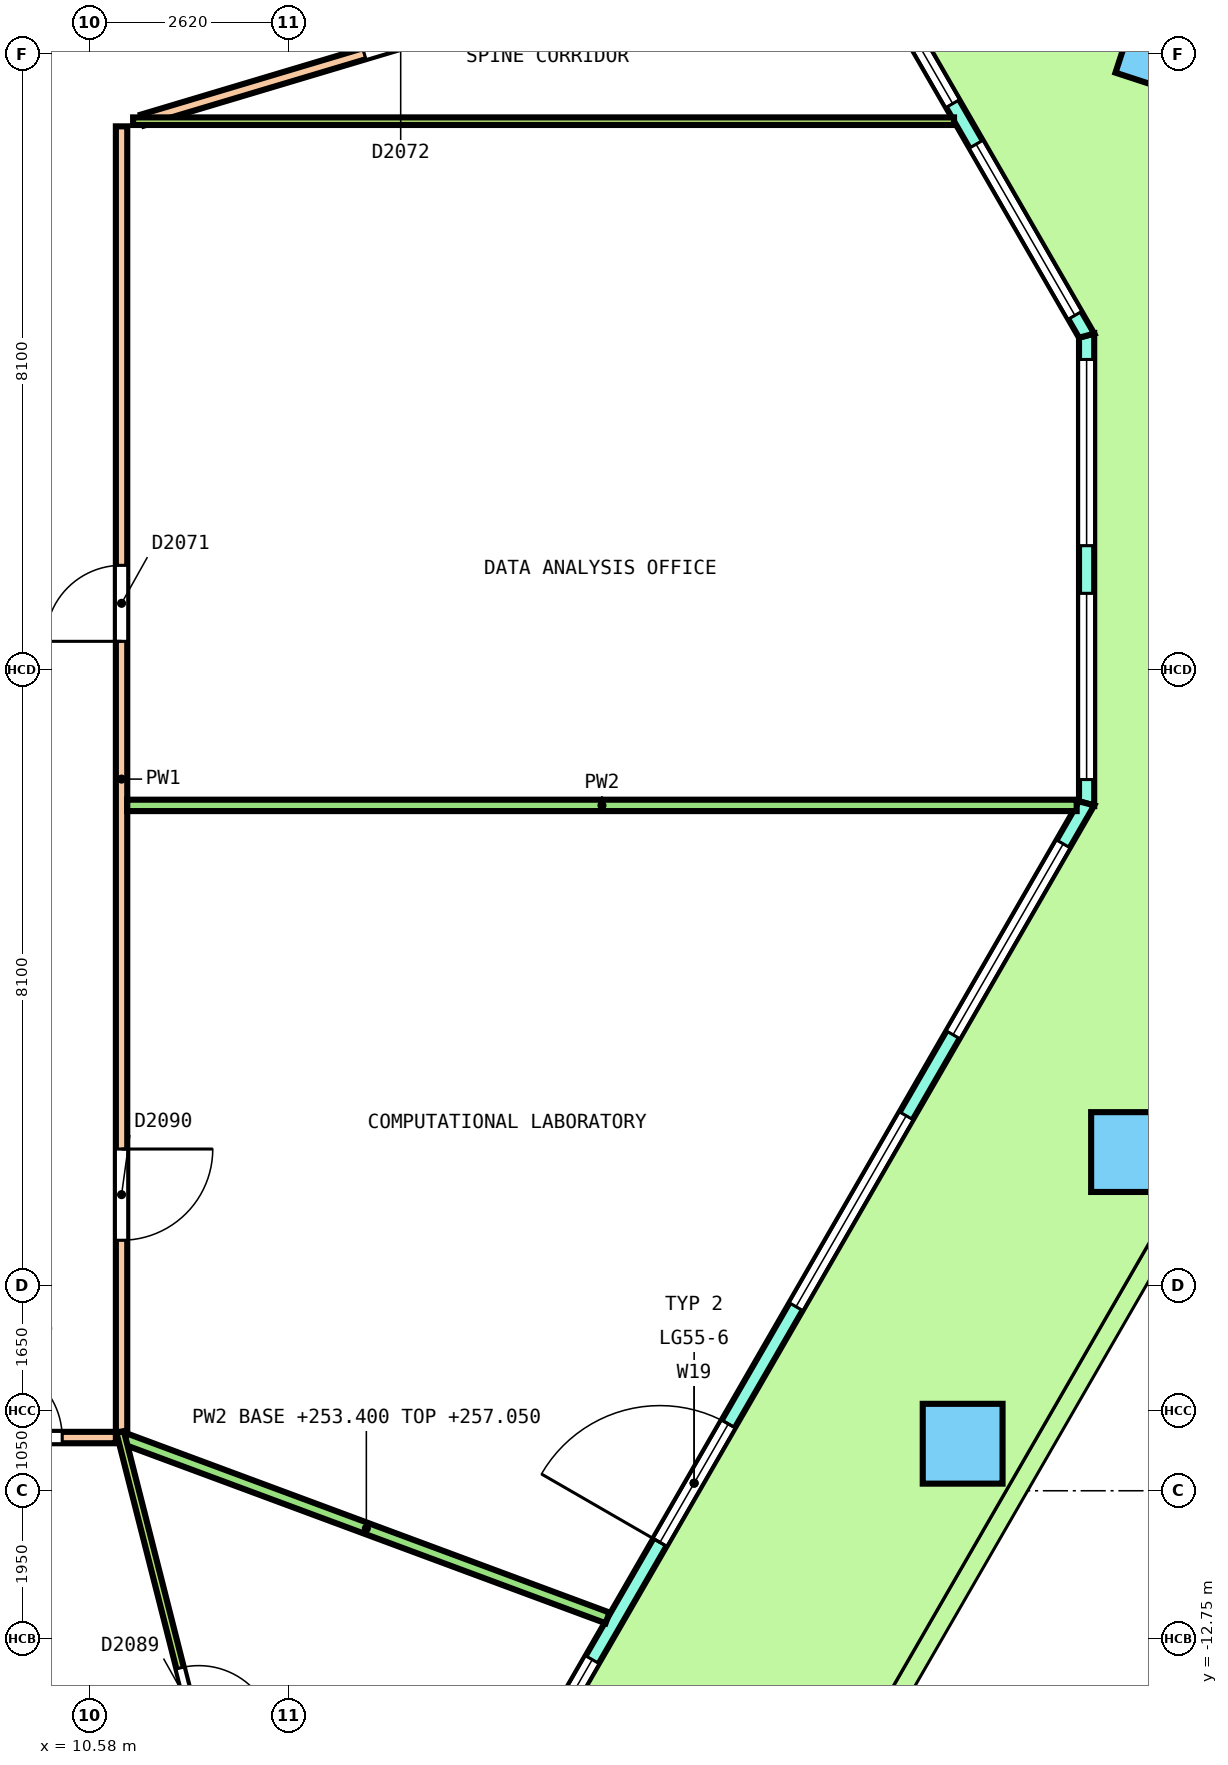
"""IFC4 building model, lengths in metres.
Left out: names, types, materials, properties, quantities, classifications, styles, units other than length and angle.
Written with IfcOpenShell. Run it as: python <this file> out.ifc"""

import sys

from ifc_helpers import new_model, si_unit, direction, frame, frame_2d, origin, origin_2d, place, context, subcontext, project, spatial, polyline, rectangle, outline, extrude, element, fill, save


model = new_model("IFC4")
c1 = context("Model", 3, precision=1e-05, world=origin(), true_north=direction((0.0, 1.0)))
c2 = subcontext(c1, "Body", "Model", "MODEL_VIEW")
j1 = project(units=[si_unit("LENGTHUNIT", "METRE"), si_unit("PLANEANGLEUNIT", "RADIAN")], contexts=[c1])
p1 = place(None, origin())
s1 = spatial("IfcSite", under=j1, at=p1, CompositionType="ELEMENT")
p2 = place(p1, origin())
s2 = spatial("IfcBuilding", under=s1, at=p2, CompositionType="ELEMENT")
p3 = place(p2, frame((0.0, 0.0, 253.4)))
s3 = spatial("IfcBuildingStorey", under=s2, at=p3, CompositionType="ELEMENT", Elevation=253.4)
p4 = place(p3, frame((24.738, 8.192, 0.0), z_axis=(-0.21585398852, -0.249223026933, 0.944084179767), x_axis=(-0.526275882719, 0.844112769498, 0.102505256644)))
e1 = element("IfcColumn", 1, at=p4, inside=s3, PredefinedType="COLUMN", context=c2, shape_type="SweptSolid", body=[
    extrude(rectangle(XDim=1.05, YDim=1.05, at=origin_2d()), origin(), (0.0, 0.0, 1.0), 3.856),
])
for number, where, z_axis, x_axis in (
    (2, (19.85, -14.019, 0.0), (0.038, 0.066, 0.997), (0.499, 0.863, -0.076)),
    (3, (22.065, -10.181, 0.0), (-0.038, -0.066, 0.997), (0.499, 0.863, 0.076)),
):
    element("IfcColumn", number, at=place(p3, frame(where, z_axis=z_axis, x_axis=x_axis)), inside=s3, PredefinedType="COLUMN", context=c2, shape_type="SweptSolid", body=[
        extrude(rectangle(XDim=1.05, YDim=1.05, at=origin_2d()), origin(), (0.0, 0.0, 1.0), 3.651),
    ])
p5 = place(p3, frame((24.281, -6.344, 0.0), z_axis=(-0.11141157775, -0.193008789623, 0.974851305313), x_axis=(0.487356172792, 0.844286105721, 0.222856304663)))
e4 = element("IfcColumn", 4, at=p5, inside=s3, PredefinedType="COLUMN", context=c2, shape_type="SweptSolid", body=[
    extrude(rectangle(XDim=1.05, YDim=1.05, at=origin_2d()), origin(), (0.0, 0.0, 1.0), 3.734),
])
p6 = place(p3, frame((23.696, -1.757, 0.0), z_axis=(0.0, 0.0, 1.0), x_axis=(0.0, 1.0, 0.0)))
e5 = element("IfcWall", 5, at=p6, inside=s3, PredefinedType="SOLIDWALL", context=c2, shape_type="SweptSolid", body=[
    extrude(outline(polyline([(-0.027, -0.1), (1.008, -0.1), (2.042, -0.1), (3.077, -0.1), (4.111, -0.1), (5.146, -0.1), (6.18, -0.1), (6.126, 0.1), (5.11, 0.1), (4.093, 0.1), (3.077, 0.1), (2.06, 0.1), (1.043, 0.1), (0.027, 0.1), (-0.027, -0.1)])), origin(), (0.0, 0.0, 1.0), 3.7),
])
p7 = place(p6, frame((0.313, 0.0, 0.1)))
e6 = element("IfcOpeningElement", 6, at=p7, cuts=e5, PredefinedType="OPENING", context=c2, shape_type="SweptSolid", body=[
    extrude(rectangle(XDim=2.45, YDim=2.65, at=frame_2d((1.225, 1.325))), frame((0.0, 0.11, 0.0), z_axis=(0.0, -1.0, 0.0), x_axis=(1.0, 0.0, 0.0)), (0.0, 0.0, 1.0), 0.22),
])
p8 = place(p6, frame((3.39, 0.0, 0.1)))
e7 = element("IfcOpeningElement", 7, at=p8, cuts=e5, PredefinedType="OPENING", context=c2, shape_type="SweptSolid", body=[
    extrude(rectangle(XDim=2.45, YDim=2.65, at=frame_2d((1.225, 1.325))), frame((0.0, 0.11, 0.0), z_axis=(0.0, -1.0, 0.0), x_axis=(1.0, 0.0, 0.0)), (0.0, 0.0, 1.0), 0.22),
])
p9 = place(p3, frame((23.696, 4.396, 0.0), z_axis=(0.0, 0.0, 1.0), x_axis=(-0.500000613642, 0.866025049498, 0.0)))
e8 = element("IfcWall", 8, at=p9, inside=s3, PredefinedType="SOLIDWALL", context=c2, shape_type="SweptSolid", body=[
    extrude(outline(polyline([(-0.027, -0.1), (0.982, -0.1), (1.99, -0.1), (2.999, -0.1), (4.007, -0.1), (5.015, -0.1), (6.024, -0.1), (7.032, -0.1), (8.041, -0.1), (9.049, -0.1), (10.058, -0.1), (11.066, -0.1), (12.075, -0.1), (13.083, -0.1), (14.092, -0.1), (15.1, -0.1), (16.108, -0.1), (16.055, 0.1), (15.053, 0.1), (14.051, 0.1), (13.05, 0.1), (12.048, 0.1), (11.046, 0.1), (10.044, 0.1), (9.042, 0.1), (8.041, 0.1), (7.039, 0.1), (6.037, 0.1), (5.036, 0.1), (4.034, 0.1), (3.032, 0.1), (2.03, 0.1), (1.029, 0.1), (0.027, 0.1), (-0.027, -0.1)])), origin(), (0.0, 0.0, 1.0), 3.7),
])
p10 = place(p9, frame((0.308, 0.0, 0.1)))
e9 = element("IfcOpeningElement", 9, at=p10, cuts=e8, PredefinedType="OPENING", context=c2, shape_type="SweptSolid", body=[
    extrude(rectangle(XDim=2.6, YDim=2.65, at=frame_2d((1.3, 1.325))), frame((0.0, 0.11, 0.0), z_axis=(0.0, -1.0, 0.0), x_axis=(1.0, 0.0, 0.0)), (0.0, 0.0, 1.0), 0.22),
])
p11 = place(p9, frame((3.524, 0.0, 0.1)))
e10 = element("IfcOpeningElement", 10, at=p11, cuts=e8, PredefinedType="OPENING", context=c2, shape_type="SweptSolid", body=[
    extrude(rectangle(XDim=2.6, YDim=2.65, at=frame_2d((1.3, 1.325))), frame((0.0, 0.11, 0.0), z_axis=(0.0, -1.0, 0.0), x_axis=(1.0, 0.0, 0.0)), (0.0, 0.0, 1.0), 0.22),
])
p12 = place(p9, frame((7.141, 0.0, 0.0)))
e11 = element("IfcOpeningElement", 11, at=p12, cuts=e8, PredefinedType="OPENING", context=c2, shape_type="SweptSolid", body=[
    extrude(rectangle(XDim=1.8, YDim=2.4, at=frame_2d((0.9, 1.2))), frame((0.0, 0.11, 0.0), z_axis=(0.0, -1.0, 0.0), x_axis=(1.0, 0.0, 0.0)), (0.0, 0.0, 1.0), 0.22),
])
p13 = place(p9, frame((7.141, 0.0, 2.55)))
e12 = element("IfcOpeningElement", 12, at=p13, cuts=e8, PredefinedType="OPENING", context=c2, shape_type="SweptSolid", body=[
    extrude(rectangle(XDim=1.8, YDim=0.2, at=frame_2d((0.9, 0.1))), frame((0.0, 0.11, 0.0), z_axis=(0.0, -1.0, 0.0), x_axis=(1.0, 0.0, 0.0)), (0.0, 0.0, 1.0), 0.22),
])
p14 = place(p9, frame((9.957, 0.0, 0.1)))
e13 = element("IfcOpeningElement", 13, at=p14, cuts=e8, PredefinedType="OPENING", context=c2, shape_type="SweptSolid", body=[
    extrude(rectangle(XDim=2.6, YDim=2.65, at=frame_2d((1.3, 1.325))), frame((0.0, 0.11, 0.0), z_axis=(0.0, -1.0, 0.0), x_axis=(1.0, 0.0, 0.0)), (0.0, 0.0, 1.0), 0.22),
])
p15 = place(p9, frame((13.174, 0.0, 0.1)))
e14 = element("IfcOpeningElement", 14, at=p15, cuts=e8, PredefinedType="OPENING", context=c2, shape_type="SweptSolid", body=[
    extrude(rectangle(XDim=2.6, YDim=2.65, at=frame_2d((1.3, 1.325))), frame((0.0, 0.11, 0.0), z_axis=(0.0, -1.0, 0.0), x_axis=(1.0, 0.0, 0.0)), (0.0, 0.0, 1.0), 0.22),
])
p16 = place(p3, frame((13.369, -19.643, 0.0), z_axis=(0.0, 0.0, 1.0), x_axis=(0.500000087574, 0.866025353224, 0.0)))
e15 = element("IfcWall", 15, at=p16, inside=s3, PredefinedType="SOLIDWALL", context=c2, shape_type="SweptSolid", body=[
    extrude(outline(polyline([(-0.027, -0.1), (1.009, -0.1), (2.044, -0.1), (3.079, -0.1), (4.115, -0.1), (5.15, -0.1), (6.185, -0.1), (7.221, -0.1), (8.256, -0.1), (9.292, -0.1), (10.327, -0.1), (11.362, -0.1), (12.398, -0.1), (13.433, -0.1), (14.469, -0.1), (15.504, -0.1), (16.539, -0.1), (17.574, -0.1), (18.61, -0.1), (19.645, -0.1), (20.681, -0.1), (20.627, 0.1), (19.597, 0.1), (18.567, 0.1), (17.537, 0.1), (16.507, 0.1), (15.477, 0.1), (14.447, 0.1), (13.417, 0.1), (12.387, 0.1), (11.357, 0.1), (10.327, 0.1), (9.297, 0.1), (8.267, 0.1), (7.237, 0.1), (6.207, 0.1), (5.177, 0.1), (4.147, 0.1), (3.117, 0.1), (2.087, 0.1), (1.057, 0.1), (0.027, 0.1), (-0.027, -0.1)])), origin(), (0.0, 0.0, 1.0), 3.7),
])
p17 = place(p16, frame((0.615, 0.0, 0.1)))
e16 = element("IfcOpeningElement", 16, at=p17, cuts=e15, PredefinedType="OPENING", context=c2, shape_type="SweptSolid", body=[
    extrude(rectangle(XDim=2.9, YDim=2.65, at=frame_2d((1.45, 1.325))), frame((0.0, 0.11, 0.0), z_axis=(0.0, -1.0, 0.0), x_axis=(1.0, 0.0, 0.0)), (0.0, 0.0, 1.0), 0.22),
])
p18 = place(p16, frame((4.746, 0.0, 0.1)))
e17 = element("IfcOpeningElement", 17, at=p18, cuts=e15, PredefinedType="OPENING", context=c2, shape_type="SweptSolid", body=[
    extrude(rectangle(XDim=2.9, YDim=2.65, at=frame_2d((1.45, 1.325))), frame((0.0, 0.11, 0.0), z_axis=(0.0, -1.0, 0.0), x_axis=(1.0, 0.0, 0.0)), (0.0, 0.0, 1.0), 0.22),
])
p19 = place(p16, frame((9.427, 0.0, 0.0)))
e18 = element("IfcOpeningElement", 18, at=p19, cuts=e15, PredefinedType="OPENING", context=c2, shape_type="SweptSolid", body=[
    extrude(rectangle(XDim=1.8, YDim=2.4, at=frame_2d((0.9, 1.2))), frame((0.0, 0.11, 0.0), z_axis=(0.0, -1.0, 0.0), x_axis=(1.0, 0.0, 0.0)), (0.0, 0.0, 1.0), 0.22),
])
p20 = place(p16, frame((9.427, 0.0, 2.55)))
e19 = element("IfcOpeningElement", 19, at=p20, cuts=e15, PredefinedType="OPENING", context=c2, shape_type="SweptSolid", body=[
    extrude(rectangle(XDim=1.8, YDim=0.2, at=frame_2d((0.9, 0.1))), frame((0.0, 0.11, 0.0), z_axis=(0.0, -1.0, 0.0), x_axis=(1.0, 0.0, 0.0)), (0.0, 0.0, 1.0), 0.22),
])
p21 = place(p16, frame((13.008, 0.0, 0.1)))
e20 = element("IfcOpeningElement", 20, at=p21, cuts=e15, PredefinedType="OPENING", context=c2, shape_type="SweptSolid", body=[
    extrude(rectangle(XDim=2.9, YDim=2.65, at=frame_2d((1.45, 1.325))), frame((0.0, 0.11, 0.0), z_axis=(0.0, -1.0, 0.0), x_axis=(1.0, 0.0, 0.0)), (0.0, 0.0, 1.0), 0.22),
])
p22 = place(p16, frame((17.139, 0.0, 0.1)))
e21 = element("IfcOpeningElement", 21, at=p22, cuts=e15, PredefinedType="OPENING", context=c2, shape_type="SweptSolid", body=[
    extrude(rectangle(XDim=2.9, YDim=2.65, at=frame_2d((1.45, 1.325))), frame((0.0, 0.11, 0.0), z_axis=(0.0, -1.0, 0.0), x_axis=(1.0, 0.0, 0.0)), (0.0, 0.0, 1.0), 0.22),
])
p23 = place(p3, frame((11.275, 7.232, 0.0), z_axis=(0.0, 0.0, 1.0), x_axis=(0.958053835168, 0.286588291665, 0.0)))
e22 = element("IfcWall", 22, at=p23, inside=s3, PredefinedType="PARTITIONING", context=c2, shape_type="SweptSolid", body=[
    extrude(rectangle(XDim=9.496, YDim=0.15, at=frame_2d((4.748, 0.0))), origin(), (0.0, 0.0, 1.0), 2.8),
])
p24 = place(p23, frame((3.046, 0.0, 0.0)))
e23 = element("IfcOpeningElement", 23, at=p24, cuts=e22, PredefinedType="OPENING", context=c2, shape_type="SweptSolid", body=[
    extrude(rectangle(XDim=1.0, YDim=2.1, at=frame_2d((0.5, 1.05))), frame((0.0, 0.085, 0.0), z_axis=(0.0, -1.0, 0.0), x_axis=(1.0, 0.0, 0.0)), (0.0, 0.0, 1.0), 0.17),
])
p25 = place(p3, frame((11.0, -10.025, 0.0), z_axis=(0.0, 0.0, 1.0), x_axis=(0.0, 1.0, 0.0)))
e24 = element("IfcWall", 24, at=p25, inside=s3, PredefinedType="PARTITIONING", context=c2, shape_type="SweptSolid", body=[
    extrude(rectangle(XDim=17.175, YDim=0.15, at=frame_2d((8.587, 0.0))), origin(), (0.0, 0.0, 1.0), 2.8),
])
p26 = place(p25, frame((10.4, 0.0, 0.0)))
e25 = element("IfcOpeningElement", 25, at=p26, cuts=e24, PredefinedType="OPENING", context=c2, shape_type="SweptSolid", body=[
    extrude(rectangle(XDim=1.0, YDim=2.1, at=frame_2d((0.5, 1.05))), frame((0.0, 0.085, 0.0), z_axis=(0.0, -1.0, 0.0), x_axis=(1.0, 0.0, 0.0)), (0.0, 0.0, 1.0), 0.17),
])
p27 = place(p25, frame((2.521, 0.0, 0.0)))
e26 = element("IfcOpeningElement", 26, at=p27, cuts=e24, PredefinedType="OPENING", context=c2, shape_type="SweptSolid", body=[
    extrude(rectangle(XDim=1.2, YDim=2.1, at=frame_2d((0.6, 1.05))), frame((0.0, 0.085, 0.0), z_axis=(0.0, -1.0, 0.0), x_axis=(1.0, 0.0, 0.0)), (0.0, 0.0, 1.0), 0.17),
])
p28 = place(p3, frame((-10.95, -10.1, 0.0), z_axis=(0.0, 0.0, 1.0), x_axis=(1.0, 0.0, 0.0)))
e27 = element("IfcWall", 27, at=p28, inside=s3, PredefinedType="PARTITIONING", context=c2, shape_type="SweptSolid", body=[
    extrude(rectangle(XDim=21.875, YDim=0.15, at=frame_2d((10.938, 0.0))), origin(), (0.0, 0.0, 1.0), 2.8),
])
p29 = place(p28, frame((3.079, 0.0, 0.0)))
e28 = element("IfcOpeningElement", 28, at=p29, cuts=e27, PredefinedType="OPENING", context=c2, shape_type="SweptSolid", body=[
    extrude(rectangle(XDim=1.2, YDim=2.1, at=frame_2d((0.6, 1.05))), frame((0.0, 0.085, 0.0), z_axis=(0.0, -1.0, 0.0), x_axis=(1.0, 0.0, 0.0)), (0.0, 0.0, 1.0), 0.17),
])
p30 = place(p28, frame((14.744, 0.0, 0.0)))
e29 = element("IfcOpeningElement", 29, at=p30, cuts=e27, PredefinedType="OPENING", context=c2, shape_type="SweptSolid", body=[
    extrude(rectangle(XDim=1.2, YDim=2.1, at=frame_2d((0.6, 1.05))), frame((0.0, 0.085, 0.0), z_axis=(0.0, -1.0, 0.0), x_axis=(1.0, 0.0, 0.0)), (0.0, 0.0, 1.0), 0.17),
])
p31 = place(p28, frame((20.169, 0.0, 0.0)))
e30 = element("IfcOpeningElement", 30, at=p31, cuts=e27, PredefinedType="OPENING", context=c2, shape_type="SweptSolid", body=[
    extrude(rectangle(XDim=1.0, YDim=2.1, at=frame_2d((0.5, 1.05))), frame((0.0, 0.085, 0.0), z_axis=(0.0, -1.0, 0.0), x_axis=(1.0, 0.0, 0.0)), (0.0, 0.0, 1.0), 0.17),
])
p32 = place(p3, frame((11.075, -1.783, 0.0), z_axis=(0.0, 0.0, 1.0), x_axis=(1.0, 0.0, 0.0)))
e31 = element("IfcWall", 31, at=p32, inside=s3, PredefinedType="PARTITIONING", context=c2, shape_type="SweptSolid", body=[
    extrude(rectangle(XDim=12.49, YDim=0.15, at=frame_2d((6.245, 0.0))), origin(), (0.0, 0.0, 1.0), 2.8),
])
p33 = place(p3, frame((11.047, -10.117, 0.0), z_axis=(0.0, 0.0, 1.0), x_axis=(0.937524105554, -0.347920323501, 0.0)))
e32 = element("IfcWall", 32, at=p33, inside=s3, PredefinedType="PARTITIONING", context=c2, shape_type="SweptSolid", body=[
    extrude(rectangle(XDim=6.77, YDim=0.15, at=frame_2d((3.385, 0.0))), origin(), (0.0, 0.0, 1.0), 3.65),
])
p34 = place(p3, frame((11.152, 7.218, 0.0), z_axis=(0.0, 0.0, 1.0), x_axis=(1.0, 0.0, 0.0)))
e33 = element("IfcWall", 33, at=p34, inside=s3, PredefinedType="PARTITIONING", context=c2, shape_type="SweptSolid", body=[
    extrude(rectangle(XDim=10.8, YDim=0.1, at=frame_2d((5.4, 0.0))), origin(), (0.0, 0.0, 1.0), 2.8),
])
p35 = place(p3, frame((10.981, -10.027, 0.0), z_axis=(0.0, 0.0, 1.0), x_axis=(0.246189836145, -0.969221628204, 0.0)))
e34 = element("IfcWall", 34, at=p35, inside=s3, PredefinedType="PARTITIONING", context=c2, shape_type="SweptSolid", body=[
    extrude(rectangle(XDim=9.71, YDim=0.1, at=frame_2d((4.855, 0.0))), origin(), (0.0, 0.0, 1.0), 2.8),
])
p36 = place(p35, frame((3.202, 0.0, 0.0)))
e35 = element("IfcOpeningElement", 35, at=p36, cuts=e34, PredefinedType="OPENING", context=c2, shape_type="SweptSolid", body=[
    extrude(rectangle(XDim=1.0, YDim=2.1, at=frame_2d((0.5, 1.05))), frame((0.0, 0.06, 0.0), z_axis=(0.0, -1.0, 0.0), x_axis=(1.0, 0.0, 0.0)), (0.0, 0.0, 1.0), 0.12),
])
p37 = place(p7, origin())
e36 = element("IfcWindow", 36, at=p37, inside=s3, PartitioningType="SINGLE_PANEL", PredefinedType="WINDOW", context=c2, shape_type="SweptSolid", body=[
    extrude(rectangle(XDim=2.45, YDim=2.65, at=frame_2d((1.225, 1.325))), frame((0.0, 0.03, 0.0), z_axis=(0.0, -1.0, 0.0), x_axis=(1.0, 0.0, 0.0)), (0.0, 0.0, 1.0), 0.06),
])
fill(e6, e36)
p38 = place(p8, origin())
e37 = element("IfcWindow", 37, at=p38, inside=s3, PartitioningType="SINGLE_PANEL", PredefinedType="WINDOW", context=c2, shape_type="SweptSolid", body=[
    extrude(rectangle(XDim=2.45, YDim=2.65, at=frame_2d((1.225, 1.325))), frame((0.0, 0.03, 0.0), z_axis=(0.0, -1.0, 0.0), x_axis=(1.0, 0.0, 0.0)), (0.0, 0.0, 1.0), 0.06),
])
fill(e7, e37)
p39 = place(p10, origin())
e38 = element("IfcWindow", 38, at=p39, inside=s3, PartitioningType="SINGLE_PANEL", PredefinedType="WINDOW", context=c2, shape_type="SweptSolid", body=[
    extrude(rectangle(XDim=2.6, YDim=2.65, at=frame_2d((1.3, 1.325))), frame((0.0, 0.03, 0.0), z_axis=(0.0, -1.0, 0.0), x_axis=(1.0, 0.0, 0.0)), (0.0, 0.0, 1.0), 0.06),
])
fill(e9, e38)
p40 = place(p11, origin())
e39 = element("IfcWindow", 39, at=p40, inside=s3, PartitioningType="SINGLE_PANEL", PredefinedType="WINDOW", context=c2, shape_type="SweptSolid", body=[
    extrude(rectangle(XDim=2.6, YDim=2.65, at=frame_2d((1.3, 1.325))), frame((0.0, 0.03, 0.0), z_axis=(0.0, -1.0, 0.0), x_axis=(1.0, 0.0, 0.0)), (0.0, 0.0, 1.0), 0.06),
])
fill(e10, e39)
p41 = place(p18, origin())
e40 = element("IfcWindow", 40, at=p41, inside=s3, PartitioningType="SINGLE_PANEL", PredefinedType="WINDOW", context=c2, shape_type="SweptSolid", body=[
    extrude(rectangle(XDim=2.9, YDim=2.65, at=frame_2d((1.45, 1.325))), frame((0.0, 0.03, 0.0), z_axis=(0.0, -1.0, 0.0), x_axis=(1.0, 0.0, 0.0)), (0.0, 0.0, 1.0), 0.06),
])
fill(e17, e40)
p42 = place(p19, origin())
e41 = element("IfcDoor", 41, at=p42, inside=s3, OperationType="DOUBLE_DOOR_SINGLE_SWING", PredefinedType="DOOR", context=c2, shape_type="SweptSolid", body=[
    extrude(rectangle(XDim=1.8, YDim=2.4, at=frame_2d((0.9, 1.2))), frame((0.0, 0.025, 0.0), z_axis=(0.0, -1.0, 0.0), x_axis=(1.0, 0.0, 0.0)), (0.0, 0.0, 1.0), 0.05),
])
fill(e18, e41)
p43 = place(p20, origin())
e42 = element("IfcWindow", 42, at=p43, inside=s3, PartitioningType="SINGLE_PANEL", PredefinedType="WINDOW", context=c2, shape_type="SweptSolid", body=[
    extrude(rectangle(XDim=1.8, YDim=0.2, at=frame_2d((0.9, 0.1))), frame((0.0, 0.03, 0.0), z_axis=(0.0, -1.0, 0.0), x_axis=(1.0, 0.0, 0.0)), (0.0, 0.0, 1.0), 0.06),
])
fill(e19, e42)
p44 = place(p21, origin())
e43 = element("IfcWindow", 43, at=p44, inside=s3, PartitioningType="SINGLE_PANEL", PredefinedType="WINDOW", context=c2, shape_type="SweptSolid", body=[
    extrude(rectangle(XDim=2.9, YDim=2.65, at=frame_2d((1.45, 1.325))), frame((0.0, 0.03, 0.0), z_axis=(0.0, -1.0, 0.0), x_axis=(1.0, 0.0, 0.0)), (0.0, 0.0, 1.0), 0.06),
])
fill(e20, e43)
p45 = place(p22, origin())
e44 = element("IfcWindow", 44, at=p45, inside=s3, PartitioningType="SINGLE_PANEL", PredefinedType="WINDOW", context=c2, shape_type="SweptSolid", body=[
    extrude(rectangle(XDim=2.9, YDim=2.65, at=frame_2d((1.45, 1.325))), frame((0.0, 0.03, 0.0), z_axis=(0.0, -1.0, 0.0), x_axis=(1.0, 0.0, 0.0)), (0.0, 0.0, 1.0), 0.06),
])
fill(e21, e44)
p46 = place(p26, origin())
e45 = element("IfcDoor", 45, at=p46, inside=s3, OperationType="SINGLE_SWING_RIGHT", PredefinedType="DOOR", context=c2, shape_type="SweptSolid", body=[
    extrude(rectangle(XDim=1.0, YDim=2.1, at=frame_2d((0.5, 1.05))), frame((0.0, 0.025, 0.0), z_axis=(0.0, -1.0, 0.0), x_axis=(1.0, 0.0, 0.0)), (0.0, 0.0, 1.0), 0.05),
])
fill(e25, e45)
p47 = place(p24, origin())
e46 = element("IfcDoor", 46, at=p47, inside=s3, OperationType="SINGLE_SWING_RIGHT", PredefinedType="DOOR", context=c2, shape_type="SweptSolid", body=[
    extrude(rectangle(XDim=1.0, YDim=2.1, at=frame_2d((0.5, 1.05))), frame((0.0, 0.025, 0.0), z_axis=(0.0, -1.0, 0.0), x_axis=(1.0, 0.0, 0.0)), (0.0, 0.0, 1.0), 0.05),
])
fill(e23, e46)
p48 = place(p31, origin())
e47 = element("IfcDoor", 47, at=p48, inside=s3, OperationType="SINGLE_SWING_LEFT", PredefinedType="DOOR", context=c2, shape_type="SweptSolid", body=[
    extrude(rectangle(XDim=1.0, YDim=2.1, at=frame_2d((0.5, 1.05))), frame((0.0, 0.025, 0.0), z_axis=(0.0, -1.0, 0.0), x_axis=(1.0, 0.0, 0.0)), (0.0, 0.0, 1.0), 0.05),
])
fill(e30, e47)
p49 = place(p36, origin())
e48 = element("IfcDoor", 48, at=p49, inside=s3, OperationType="SINGLE_SWING_RIGHT", PredefinedType="DOOR", context=c2, shape_type="SweptSolid", body=[
    extrude(rectangle(XDim=1.0, YDim=2.1, at=frame_2d((0.5, 1.05))), frame((0.0, 0.025, 0.0), z_axis=(0.0, -1.0, 0.0), x_axis=(1.0, 0.0, 0.0)), (0.0, 0.0, 1.0), 0.05),
])
fill(e35, e48)
p50 = place(p27, origin())
e49 = element("IfcDoor", 49, at=p50, inside=s3, OperationType="DOUBLE_DOOR_SINGLE_SWING", PredefinedType="DOOR", context=c2, shape_type="SweptSolid", body=[
    extrude(rectangle(XDim=1.2, YDim=2.1, at=frame_2d((0.6, 1.05))), frame((0.0, 0.025, 0.0), z_axis=(0.0, -1.0, 0.0), x_axis=(1.0, 0.0, 0.0)), (0.0, 0.0, 1.0), 0.05),
])
fill(e26, e49)
save(model, sys.argv[1])
